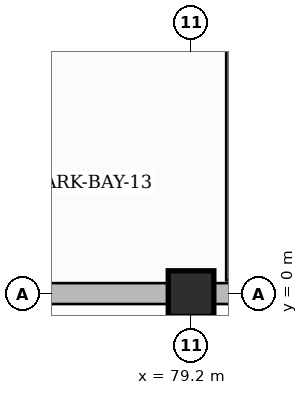
"""IFC4 building model, lengths in metres.
Left out: names, types, materials, properties, quantities, classifications, styles, units other than length and angle.
Written with IfcOpenShell. Run it as: python <this file> out.ifc"""

import sys

from ifc_helpers import new_model, si_unit, direction, frame, frame_2d, origin, origin_2d, place, context, subcontext, project, spatial, rectangle, extrude, source, transform, mapped, element, save


model = new_model("IFC4")
c1 = context("Model", 3, precision=1e-05, world=origin(), true_north=direction((0.0, 1.0)))
c2 = subcontext(c1, "Body", "Model", "MODEL_VIEW")
j1 = project(units=[si_unit("LENGTHUNIT", "METRE"), si_unit("PLANEANGLEUNIT", "RADIAN")], contexts=[c1])
p1 = place(None, origin())
s1 = spatial("IfcSite", under=j1, at=p1, CompositionType="ELEMENT")
p2 = place(p1, origin())
s2 = spatial("IfcBuilding", under=s1, at=p2, CompositionType="ELEMENT")
p3 = place(p2, frame((0.0, 0.0, -6.5)))
s3 = spatial("IfcBuildingStorey", under=s2, at=p3, CompositionType="ELEMENT", Elevation=-6.5)
p4 = place(p3, frame((-4.8, 0.0, 0.0), z_axis=(0.0, 0.0, 1.0), x_axis=(1.0, 0.0, 0.0)))
e1 = element("IfcWall", 1, at=p4, inside=s3, PredefinedType="USERDEFINED", context=c2, shape_type="SweptSolid", body=[
    extrude(rectangle(XDim=85.2, YDim=0.55, at=frame_2d((42.6, 0.0))), origin(), (0.0, 0.0, 1.0), 6.5),
])
p5 = place(p3, frame((80.4, 0.35, 0.0), z_axis=(0.0, 0.0, 1.0), x_axis=(0.0, 1.0, 0.0)))
e2 = element("IfcWall", 2, at=p5, inside=s3, PredefinedType="USERDEFINED", context=c2, shape_type="SweptSolid", body=[
    extrude(rectangle(XDim=46.1, YDim=0.55, at=frame_2d((23.05, 0.0))), origin(), (0.0, 0.0, 1.0), 6.5),
])
m1 = source(origin(), c2, "Body", "SweptSolid", [
    extrude(rectangle(XDim=1.2, YDim=1.2, at=origin_2d()), origin(), (0.0, 0.0, 1.0), 6.5),
])
p6 = place(p3, frame((79.2, 0.0, 0.0), z_axis=(0.0, 0.0, 1.0), x_axis=(1.0, 0.0, 0.0)))
e3 = element("IfcColumn", 3, at=p6, inside=s3, PredefinedType="COLUMN", context=c2, shape_type="MappedRepresentation", body=[
    mapped(m1, transform((0.0, 0.0, 0.0), scale=1.0)),
])
save(model, sys.argv[1])
